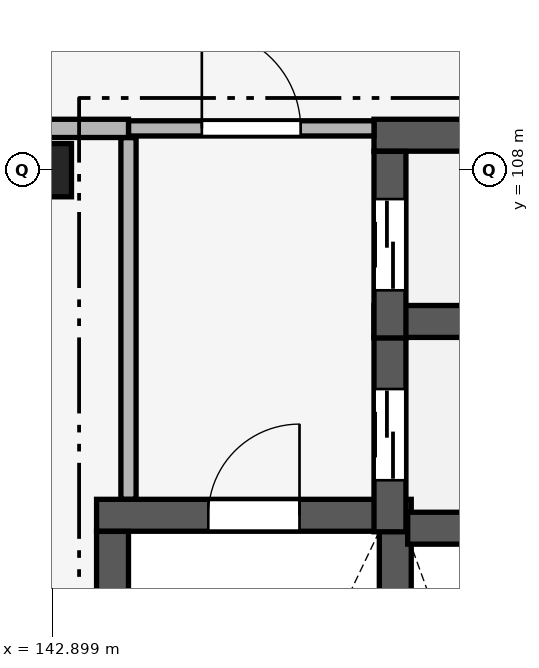
"""IFC4 building model, lengths in metres.
Left out: names, types, materials, properties, quantities, classifications, styles, units other than length and angle.
Written with IfcOpenShell. Run it as: python <this file> out.ifc"""

import sys

from ifc_helpers import new_model, si_unit, direction, frame, frame_2d, origin, origin_2d, place, context, subcontext, project, spatial, rectangle, extrude, element, fill, save


model = new_model("IFC4")
c1 = context("Model", 3, precision=1e-05, world=origin(), true_north=direction((0.0, 1.0)))
c2 = subcontext(c1, "Body", "Model", "MODEL_VIEW")
j1 = project(units=[si_unit("LENGTHUNIT", "METRE"), si_unit("PLANEANGLEUNIT", "RADIAN")], contexts=[c1])
p1 = place(None, origin())
s1 = spatial("IfcSite", under=j1, at=p1, CompositionType="ELEMENT")
p2 = place(p1, origin())
s2 = spatial("IfcBuilding", under=s1, at=p2, CompositionType="ELEMENT")
p3 = place(p2, frame((0.0, 0.0, 33.6)))
s3 = spatial("IfcBuildingStorey", under=s2, at=p3, CompositionType="ELEMENT", Elevation=33.6)
p4 = place(p3, frame((142.8, 108.0, 0.0), z_axis=(0.0, 0.0, 1.0), x_axis=(1.0, 0.0, 0.0)))
e1 = element("IfcColumn", 1, at=p4, inside=s3, PredefinedType="COLUMN", context=c2, shape_type="SweptSolid", body=[
    extrude(rectangle(XDim=0.7, YDim=0.7, at=origin_2d()), origin(), (0.0, 0.0, 1.0), 4.2),
])
p5 = place(p3, frame((143.48, 103.46, 0.0), z_axis=(0.0, 0.0, 1.0), x_axis=(1.0, 0.0, 0.0)))
e2 = element("IfcWall", 2, at=p5, inside=s3, PredefinedType="SHEAR", context=c2, shape_type="SweptSolid", body=[
    extrude(rectangle(XDim=4.14, YDim=0.42, at=frame_2d((2.07, 0.0))), origin(), (0.0, 0.0, 1.0), 3.95),
])
p6 = place(p5, frame((1.47, 0.0, 0.0)))
e3 = element("IfcOpeningElement", 3, at=p6, cuts=e2, PredefinedType="OPENING", context=c2, shape_type="SweptSolid", body=[
    extrude(rectangle(XDim=1.2, YDim=2.2, at=frame_2d((0.6, 1.1))), frame((0.0, 0.225, 0.0), z_axis=(0.0, -1.0, 0.0), x_axis=(1.0, 0.0, 0.0)), (0.0, 0.0, 1.0), 0.45),
])
for number, where, z_axis, x_axis in (
    (4, (143.69, 96.352, 0.0), (0.0, 0.0, 1.0), (0.0, 1.0, 0.0)),
    (5, (147.41, 96.352, 0.0), (0.0, 0.0, 1.0), (0.0, 1.0, 0.0)),
):
    element("IfcWall", number, at=place(p3, frame(where, z_axis=z_axis, x_axis=x_axis)), inside=s3, PredefinedType="SHEAR", context=c2, shape_type="SweptSolid", body=[
        extrude(rectangle(XDim=6.896, YDim=0.42, at=frame_2d((3.448, 0.0))), origin(), (0.0, 0.0, 1.0), 3.95),
    ])
p7 = place(p3, frame((147.573, 103.29, 0.0), z_axis=(0.0, 0.0, 1.0), x_axis=(1.0, 0.0, 0.0)))
e6 = element("IfcWall", 6, at=p7, inside=s3, PredefinedType="SHEAR", context=c2, shape_type="SweptSolid", body=[
    extrude(rectangle(XDim=2.897, YDim=0.42, at=frame_2d((1.448, 0.0))), origin(), (0.0, 0.0, 1.0), 3.95),
])
p8 = place(p3, frame((147.13, 106.01, 0.0), z_axis=(0.0, 0.0, 1.0), x_axis=(1.0, 0.0, 0.0)))
e7 = element("IfcWall", 7, at=p8, inside=s3, PredefinedType="SHEAR", context=c2, shape_type="SweptSolid", body=[
    extrude(rectangle(XDim=3.34, YDim=0.42, at=frame_2d((1.67, 0.0))), origin(), (0.0, 0.0, 1.0), 3.95),
])
p9 = place(p3, frame((147.34, 103.243, 0.0), z_axis=(0.0, 0.0, 1.0), x_axis=(0.0, 1.0, 0.0)))
e8 = element("IfcWall", 8, at=p9, inside=s3, PredefinedType="SHEAR", context=c2, shape_type="SweptSolid", body=[
    extrude(rectangle(XDim=2.555, YDim=0.42, at=frame_2d((1.278, 0.0))), origin(), (0.0, 0.0, 1.0), 3.95),
])
p10 = place(p9, frame((0.678, 0.0, 0.0)))
e9 = element("IfcOpeningElement", 9, at=p10, cuts=e8, PredefinedType="OPENING", context=c2, shape_type="SweptSolid", body=[
    extrude(rectangle(XDim=1.2, YDim=2.15, at=frame_2d((0.6, 1.075))), frame((0.0, 0.225, 0.0), z_axis=(0.0, -1.0, 0.0), x_axis=(1.0, 0.0, 0.0)), (0.0, 0.0, 1.0), 0.45),
])
p11 = place(p3, frame((147.13, 108.46, 0.0), z_axis=(0.0, 0.0, 1.0), x_axis=(1.0, 0.0, 0.0)))
e10 = element("IfcWall", 10, at=p11, inside=s3, PredefinedType="SHEAR", context=c2, shape_type="SweptSolid", body=[
    extrude(rectangle(XDim=3.741, YDim=0.42, at=frame_2d((1.871, 0.0))), origin(), (0.0, 0.0, 1.0), 3.95),
])
p12 = place(p3, frame((147.34, 105.793, 0.0), z_axis=(0.0, 0.0, 1.0), x_axis=(0.0, 1.0, 0.0)))
e11 = element("IfcWall", 11, at=p12, inside=s3, PredefinedType="SHEAR", context=c2, shape_type="SweptSolid", body=[
    extrude(rectangle(XDim=2.455, YDim=0.42, at=frame_2d((1.228, 0.0))), origin(), (0.0, 0.0, 1.0), 3.95),
])
p13 = place(p12, frame((0.627, 0.0, 0.0)))
e12 = element("IfcOpeningElement", 12, at=p13, cuts=e11, PredefinedType="OPENING", context=c2, shape_type="SweptSolid", body=[
    extrude(rectangle(XDim=1.2, YDim=2.15, at=frame_2d((0.6, 1.075))), frame((0.0, 0.225, 0.0), z_axis=(0.0, -1.0, 0.0), x_axis=(1.0, 0.0, 0.0)), (0.0, 0.0, 1.0), 0.45),
])
p14 = place(p3, frame((143.9, 108.55, 0.0), z_axis=(0.0, 0.0, 1.0), x_axis=(1.0, 0.0, 0.0)))
e13 = element("IfcWall", 13, at=p14, inside=s3, PredefinedType="PARTITIONING", context=c2, shape_type="SweptSolid", body=[
    extrude(rectangle(XDim=3.23, YDim=0.2, at=frame_2d((1.615, 0.0))), origin(), (0.0, 0.0, 1.0), 3.95),
])
p15 = place(p14, frame((0.965, 0.0, 0.0)))
e14 = element("IfcOpeningElement", 14, at=p15, cuts=e13, PredefinedType="OPENING", context=c2, shape_type="SweptSolid", body=[
    extrude(rectangle(XDim=1.3, YDim=2.2, at=frame_2d((0.65, 1.1))), frame((0.0, 0.115, 0.0), z_axis=(0.0, -1.0, 0.0), x_axis=(1.0, 0.0, 0.0)), (0.0, 0.0, 1.0), 0.23),
])
p16 = place(p3, frame((142.456, 108.55, 0.0), z_axis=(0.0, 0.0, 1.0), x_axis=(1.0, 0.0, 0.0)))
e15 = element("IfcWall", 15, at=p16, inside=s3, PredefinedType="PARTITIONING", context=c2, shape_type="SweptSolid", body=[
    extrude(rectangle(XDim=1.444, YDim=0.24, at=frame_2d((0.722, 0.0))), origin(), (0.0, 0.0, 1.0), 3.4),
])
p17 = place(p3, frame((143.9, 103.672, 0.0), z_axis=(0.0, 0.0, 1.0), x_axis=(0.0, 1.0, 0.0)))
e16 = element("IfcWall", 16, at=p17, inside=s3, PredefinedType="PARTITIONING", context=c2, shape_type="SweptSolid", body=[
    extrude(rectangle(XDim=4.756, YDim=0.2, at=frame_2d((2.378, 0.0))), origin(), (0.0, 0.0, 1.0), 3.95),
])
p18 = place(p6, origin())
e17 = element("IfcDoor", 17, at=p18, inside=s3, OperationType="SINGLE_SWING_RIGHT", PredefinedType="DOOR", context=c2, shape_type="SweptSolid", body=[
    extrude(rectangle(XDim=1.2, YDim=2.2, at=frame_2d((0.6, 1.1))), frame((0.0, 0.025, 0.0), z_axis=(0.0, -1.0, 0.0), x_axis=(1.0, 0.0, 0.0)), (0.0, 0.0, 1.0), 0.05),
])
fill(e3, e17)
p19 = place(p10, origin())
e18 = element("IfcDoor", 18, at=p19, inside=s3, OperationType="DOUBLE_DOOR_SLIDING", PredefinedType="DOOR", context=c2, shape_type="SweptSolid", body=[
    extrude(rectangle(XDim=1.2, YDim=2.15, at=frame_2d((0.6, 1.075))), frame((0.0, 0.025, 0.0), z_axis=(0.0, -1.0, 0.0), x_axis=(1.0, 0.0, 0.0)), (0.0, 0.0, 1.0), 0.05),
])
fill(e9, e18)
p20 = place(p13, origin())
e19 = element("IfcDoor", 19, at=p20, inside=s3, OperationType="DOUBLE_DOOR_SLIDING", PredefinedType="DOOR", context=c2, shape_type="SweptSolid", body=[
    extrude(rectangle(XDim=1.2, YDim=2.15, at=frame_2d((0.6, 1.075))), frame((0.0, 0.025, 0.0), z_axis=(0.0, -1.0, 0.0), x_axis=(1.0, 0.0, 0.0)), (0.0, 0.0, 1.0), 0.05),
])
fill(e12, e19)
p21 = place(p15, origin())
e20 = element("IfcDoor", 20, at=p21, inside=s3, OperationType="SINGLE_SWING_LEFT", PredefinedType="DOOR", context=c2, shape_type="SweptSolid", body=[
    extrude(rectangle(XDim=1.3, YDim=2.2, at=frame_2d((0.65, 1.1))), frame((0.0, 0.025, 0.0), z_axis=(0.0, -1.0, 0.0), x_axis=(1.0, 0.0, 0.0)), (0.0, 0.0, 1.0), 0.05),
])
fill(e14, e20)
save(model, sys.argv[1])
